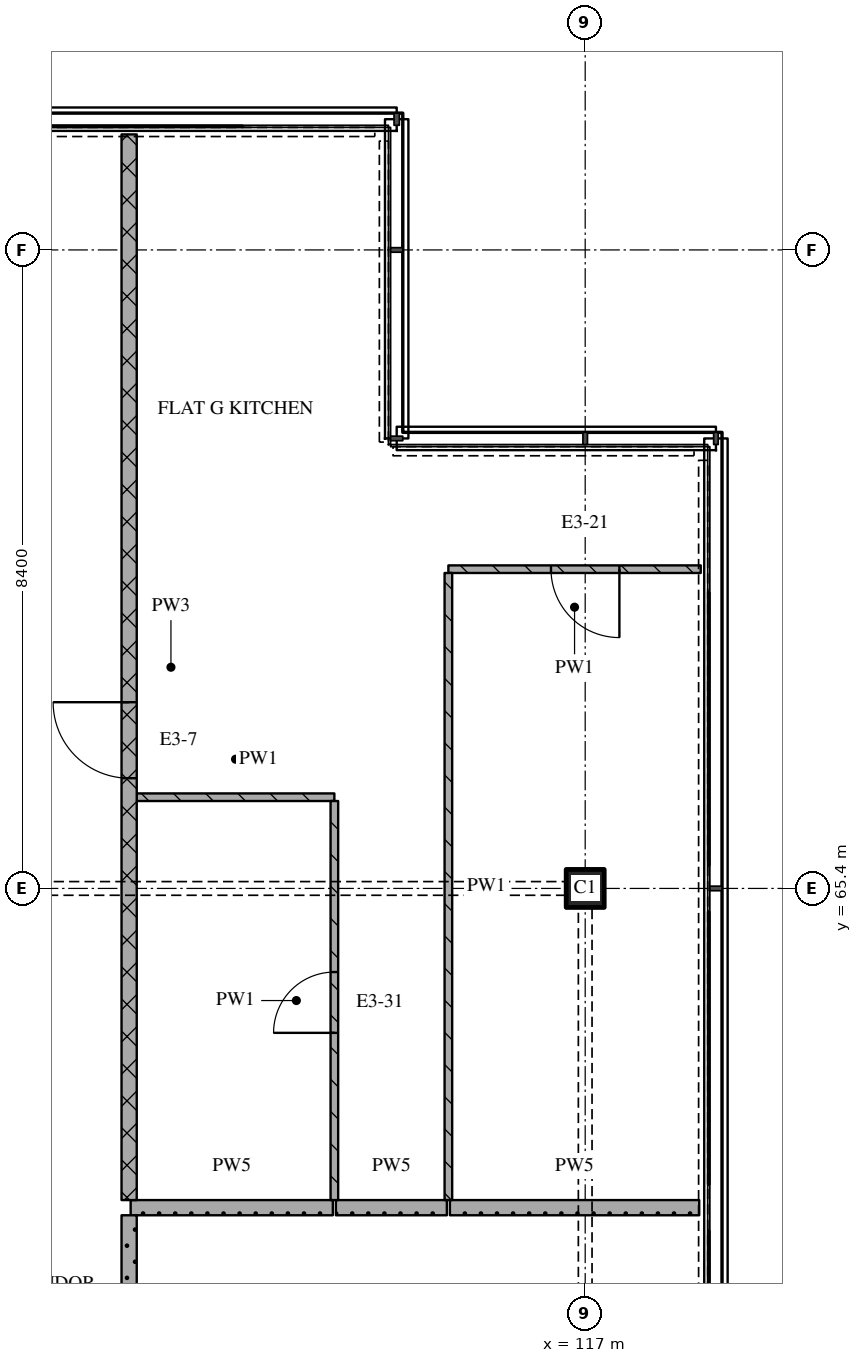
"""IFC4 building model, lengths in metres.
Left out: names, types, materials, properties, quantities, classifications, styles, units other than length and angle.
Written with IfcOpenShell. Run it as: python <this file> out.ifc"""

import sys

from ifc_helpers import new_model, si_unit, direction, frame, frame_2d, origin, origin_2d, place, context, subcontext, project, spatial, rectangle, extrude, element, fill, save


model = new_model("IFC4")
c1 = context("Model", 3, precision=1e-05, world=origin(), true_north=direction((0.0, 1.0)))
c2 = subcontext(c1, "Body", "Model", "MODEL_VIEW")
j1 = project(units=[si_unit("LENGTHUNIT", "METRE"), si_unit("PLANEANGLEUNIT", "RADIAN")], contexts=[c1])
p1 = place(None, origin())
s1 = spatial("IfcSite", under=j1, at=p1, CompositionType="ELEMENT")
p2 = place(p1, origin())
s2 = spatial("IfcBuilding", under=s1, at=p2, CompositionType="ELEMENT")
p3 = place(p2, frame((0.0, 0.0, 277.95)))
s3 = spatial("IfcBuildingStorey", under=s2, at=p3, CompositionType="ELEMENT", Elevation=277.95)
p4 = place(p3, frame((117.0, 65.4, 0.0), z_axis=(0.0, 0.0, 1.0), x_axis=(1.0, 0.0, 0.0)))
e1 = element("IfcColumn", 1, at=p4, inside=s3, PredefinedType="COLUMN", context=c2, shape_type="SweptSolid", body=[
    extrude(rectangle(XDim=0.5, YDim=0.5, at=origin_2d()), origin(), (0.0, 0.0, 1.0), 3.6),
])
p5 = place(p3, frame((111.02, 61.2, 0.0), z_axis=(0.0, 0.0, 1.0), x_axis=(1.0, 0.0, 0.0)))
e2 = element("IfcWall", 2, at=p5, inside=s3, PredefinedType="PARTITIONING", context=c2, shape_type="SweptSolid", body=[
    extrude(rectangle(XDim=2.66, YDim=0.2, at=frame_2d((1.33, 0.0))), origin(), (0.0, 0.0, 1.0), 3.32),
])
p6 = place(p3, frame((113.72, 61.2, 0.0), z_axis=(0.0, 0.0, 1.0), x_axis=(1.0, 0.0, 0.0)))
e3 = element("IfcWall", 3, at=p6, inside=s3, PredefinedType="PARTITIONING", context=c2, shape_type="SweptSolid", body=[
    extrude(rectangle(XDim=1.46, YDim=0.2, at=frame_2d((0.73, 0.0))), origin(), (0.0, 0.0, 1.0), 3.32),
])
p7 = place(p3, frame((115.22, 61.2, 0.0), z_axis=(0.0, 0.0, 1.0), x_axis=(1.0, 0.0, 0.0)))
e4 = element("IfcWall", 4, at=p7, inside=s3, PredefinedType="PARTITIONING", context=c2, shape_type="SweptSolid", body=[
    extrude(rectangle(XDim=3.28, YDim=0.2, at=frame_2d((1.64, 0.0))), origin(), (0.0, 0.0, 1.0), 3.32),
])
p8 = place(p3, frame((111.1, 66.6, 0.0), z_axis=(0.0, 0.0, 1.0), x_axis=(1.0, 0.0, 0.0)))
e5 = element("IfcWall", 5, at=p8, inside=s3, PredefinedType="PARTITIONING", context=c2, shape_type="SweptSolid", body=[
    extrude(rectangle(XDim=2.6, YDim=0.1, at=frame_2d((1.3, 0.0))), origin(), (0.0, 0.0, 1.0), 3.32),
])
p9 = place(p3, frame((118.52, 69.6, 0.0), z_axis=(0.0, 0.0, 1.0), x_axis=(-1.0, 0.0, 0.0)))
e6 = element("IfcWall", 6, at=p9, inside=s3, PredefinedType="PARTITIONING", context=c2, shape_type="SweptSolid", body=[
    extrude(rectangle(XDim=3.32, YDim=0.1, at=frame_2d((1.66, 0.0))), origin(), (0.0, 0.0, 1.0), 3.32),
])
p10 = place(p9, frame((1.07, 0.0, 0.0)))
e7 = element("IfcOpeningElement", 7, at=p10, cuts=e6, PredefinedType="OPENING", context=c2, shape_type="SweptSolid", body=[
    extrude(rectangle(XDim=0.9, YDim=2.1, at=frame_2d((0.45, 1.05))), frame((0.0, 0.06, 0.0), z_axis=(0.0, -1.0, 0.0), x_axis=(1.0, 0.0, 0.0)), (0.0, 0.0, 1.0), 0.12),
])
p11 = place(p3, frame((111.0, 75.32, 0.0), z_axis=(0.0, 0.0, 1.0), x_axis=(0.0, -1.0, 0.0)))
e8 = element("IfcWall", 8, at=p11, inside=s3, PredefinedType="PARTITIONING", context=c2, shape_type="SweptSolid", body=[
    extrude(rectangle(XDim=14.02, YDim=0.2, at=frame_2d((7.01, 0.0))), origin(), (0.0, 0.0, 1.0), 3.32),
])
p12 = place(p11, frame((7.47, 0.0, 0.0)))
e9 = element("IfcOpeningElement", 9, at=p12, cuts=e8, PredefinedType="OPENING", context=c2, shape_type="SweptSolid", body=[
    extrude(rectangle(XDim=1.0, YDim=2.1, at=frame_2d((0.5, 1.05))), frame((0.0, 0.11, 0.0), z_axis=(0.0, -1.0, 0.0), x_axis=(1.0, 0.0, 0.0)), (0.0, 0.0, 1.0), 0.22),
])
p13 = place(p3, frame((111.0, 61.1, 0.0), z_axis=(0.0, 0.0, 1.0), x_axis=(0.0, -1.0, 0.0)))
e10 = element("IfcWall", 10, at=p13, inside=s3, PredefinedType="PARTITIONING", context=c2, shape_type="SweptSolid", body=[
    extrude(rectangle(XDim=2.2, YDim=0.2, at=frame_2d((1.1, 0.0))), origin(), (0.0, 0.0, 1.0), 3.32),
])
p14 = place(p3, frame((113.7, 61.3, 0.0), z_axis=(0.0, 0.0, 1.0), x_axis=(0.0, 1.0, 0.0)))
e11 = element("IfcWall", 11, at=p14, inside=s3, PredefinedType="PARTITIONING", context=c2, shape_type="SweptSolid", body=[
    extrude(rectangle(XDim=5.25, YDim=0.1, at=frame_2d((2.625, 0.0))), origin(), (0.0, 0.0, 1.0), 3.32),
])
p15 = place(p14, frame((2.2, 0.0, 0.0)))
e12 = element("IfcOpeningElement", 12, at=p15, cuts=e11, PredefinedType="OPENING", context=c2, shape_type="SweptSolid", body=[
    extrude(rectangle(XDim=0.8, YDim=2.1, at=frame_2d((0.4, 1.05))), frame((0.0, 0.06, 0.0), z_axis=(0.0, -1.0, 0.0), x_axis=(1.0, 0.0, 0.0)), (0.0, 0.0, 1.0), 0.12),
])
p16 = place(p3, frame((115.2, 69.55, 0.0), z_axis=(0.0, 0.0, 1.0), x_axis=(0.0, -1.0, 0.0)))
e13 = element("IfcWall", 13, at=p16, inside=s3, PredefinedType="PARTITIONING", context=c2, shape_type="SweptSolid", body=[
    extrude(rectangle(XDim=8.25, YDim=0.1, at=frame_2d((4.125, 0.0))), origin(), (0.0, 0.0, 1.0), 3.32),
])
p17 = place(p10, origin())
e14 = element("IfcDoor", 14, at=p17, inside=s3, OperationType="SINGLE_SWING_LEFT", PredefinedType="DOOR", context=c2, shape_type="SweptSolid", body=[
    extrude(rectangle(XDim=0.9, YDim=2.1, at=frame_2d((0.45, 1.05))), frame((0.0, 0.025, 0.0), z_axis=(0.0, -1.0, 0.0), x_axis=(1.0, 0.0, 0.0)), (0.0, 0.0, 1.0), 0.05),
])
fill(e7, e14)
p18 = place(p12, origin())
e15 = element("IfcDoor", 15, at=p18, inside=s3, OperationType="SINGLE_SWING_RIGHT", PredefinedType="DOOR", context=c2, shape_type="SweptSolid", body=[
    extrude(rectangle(XDim=1.0, YDim=2.1, at=frame_2d((0.5, 1.05))), frame((0.0, 0.025, 0.0), z_axis=(0.0, -1.0, 0.0), x_axis=(1.0, 0.0, 0.0)), (0.0, 0.0, 1.0), 0.05),
])
fill(e9, e15)
p19 = place(p15, origin())
e16 = element("IfcDoor", 16, at=p19, inside=s3, OperationType="SINGLE_SWING_LEFT", PredefinedType="DOOR", context=c2, shape_type="SweptSolid", body=[
    extrude(rectangle(XDim=0.8, YDim=2.1, at=frame_2d((0.4, 1.05))), frame((0.0, 0.025, 0.0), z_axis=(0.0, -1.0, 0.0), x_axis=(1.0, 0.0, 0.0)), (0.0, 0.0, 1.0), 0.05),
])
fill(e12, e16)
save(model, sys.argv[1])
